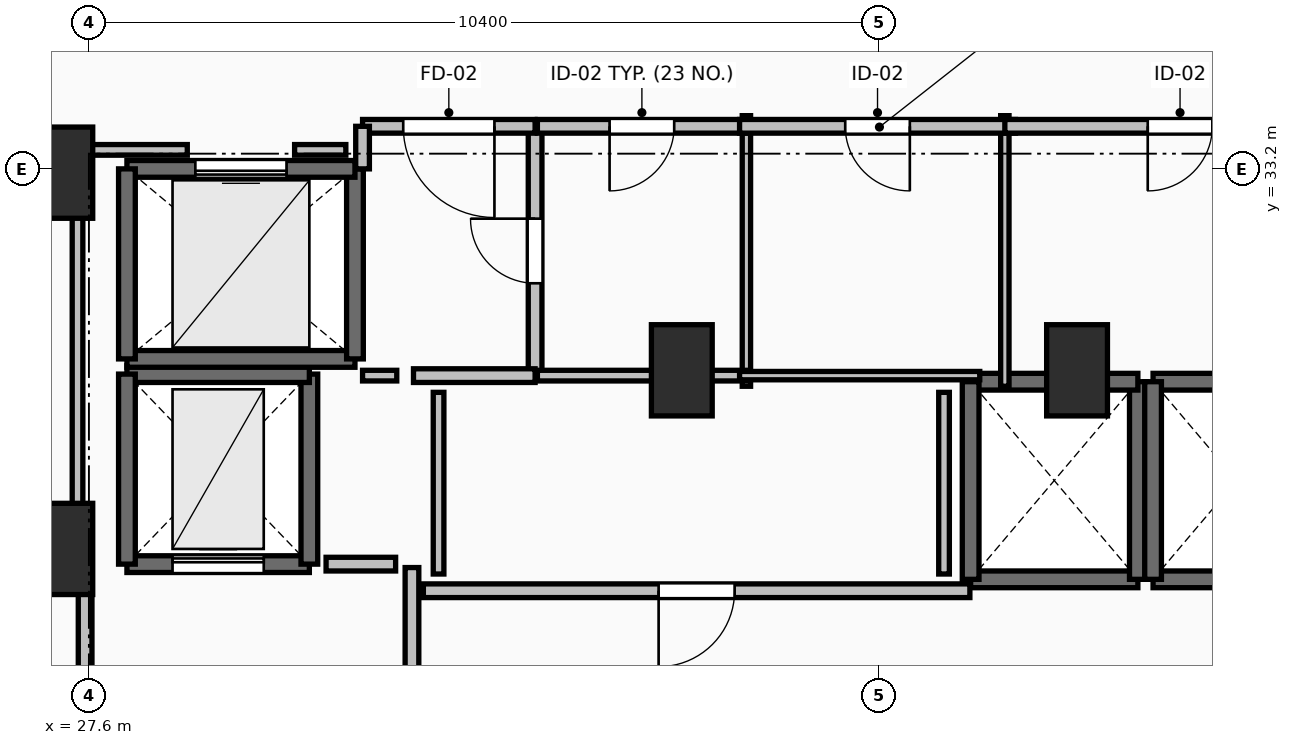
"""IFC4 building model, lengths in metres.
Left out: names, types, materials, properties, quantities, classifications, styles, units other than length and angle.
Written with IfcOpenShell. Run it as: python <this file> out.ifc"""

import sys

from ifc_helpers import new_model, si_unit, direction, frame, frame_2d, origin, origin_2d, place, context, subcontext, project, spatial, rectangle, extrude, element, fill, save


model = new_model("IFC4")
c1 = context("Model", 3, precision=1e-05, world=origin(), true_north=direction((0.0, 1.0)))
c2 = subcontext(c1, "Body", "Model", "MODEL_VIEW")
j1 = project(units=[si_unit("LENGTHUNIT", "METRE"), si_unit("PLANEANGLEUNIT", "RADIAN")], contexts=[c1])
p1 = place(None, origin())
s1 = spatial("IfcSite", under=j1, at=p1, CompositionType="ELEMENT")
p2 = place(p1, origin())
s2 = spatial("IfcBuilding", under=s1, at=p2, CompositionType="ELEMENT")
p3 = place(p2, frame((0.0, 0.0, 164.1)))
s3 = spatial("IfcBuildingStorey", under=s2, at=p3, CompositionType="ELEMENT", Elevation=164.1)
for number, where, z_axis, x_axis in (
    (1, (27.25, 28.2, 0.0), (0.0, 0.0, 1.0), (1.0, 0.0, 0.0)),
    (2, (27.25, 33.15, 0.0), (0.0, 0.0, 1.0), (1.0, 0.0, 0.0)),
    (3, (35.4, 30.55, 0.0), (0.0, 0.0, 1.0), (1.0, 0.0, 0.0)),
    (4, (40.6, 30.55, 0.0), (0.0, 0.0, 1.0), (1.0, 0.0, 0.0)),
):
    element("IfcColumn", number, at=place(p3, frame(where, z_axis=z_axis, x_axis=x_axis)), inside=s3, PredefinedType="PILASTER", context=c2, shape_type="SweptSolid", body=[
        extrude(rectangle(XDim=0.8, YDim=1.2, at=origin_2d()), origin(), (0.0, 0.0, 1.0), 3.5),
    ])
p4 = place(p3, frame((39.2, 27.8, 0.0), z_axis=(0.0, 0.0, 1.0), x_axis=(1.0, 0.0, 0.0)))
e5 = element("IfcWall", 5, at=p4, inside=s3, PredefinedType="SOLIDWALL", context=c2, shape_type="SweptSolid", body=[
    extrude(rectangle(XDim=2.2, YDim=0.22, at=frame_2d((1.1, 0.0))), origin(), (0.0, 0.0, 1.0), 3.24),
])
p5 = place(p3, frame((41.4, 27.8, 0.0), z_axis=(0.0, 0.0, 1.0), x_axis=(0.0, 1.0, 0.0)))
e6 = element("IfcWall", 6, at=p5, inside=s3, PredefinedType="SOLIDWALL", context=c2, shape_type="SweptSolid", body=[
    extrude(rectangle(XDim=2.6, YDim=0.22, at=frame_2d((1.3, 0.0))), origin(), (0.0, 0.0, 1.0), 3.24),
])
p6 = place(p3, frame((41.4, 30.4, 0.0), z_axis=(0.0, 0.0, 1.0), x_axis=(-1.0, 0.0, 0.0)))
e7 = element("IfcWall", 7, at=p6, inside=s3, PredefinedType="SOLIDWALL", context=c2, shape_type="SweptSolid", body=[
    extrude(rectangle(XDim=2.2, YDim=0.22, at=frame_2d((1.1, 0.0))), origin(), (0.0, 0.0, 1.0), 3.24),
])
p7 = place(p3, frame((39.2, 30.4, 0.0), z_axis=(0.0, 0.0, 1.0), x_axis=(0.0, -1.0, 0.0)))
e8 = element("IfcWall", 8, at=p7, inside=s3, PredefinedType="SOLIDWALL", context=c2, shape_type="SweptSolid", body=[
    extrude(rectangle(XDim=2.6, YDim=0.22, at=frame_2d((1.3, 0.0))), origin(), (0.0, 0.0, 1.0), 3.24),
])
for number, where, z_axis, x_axis in (
    (9, (41.6, 27.8, 0.0), (0.0, 0.0, 1.0), (1.0, 0.0, 0.0)),
    (10, (43.8, 30.4, 0.0), (0.0, 0.0, 1.0), (-1.0, 0.0, 0.0)),
):
    element("IfcWall", number, at=place(p3, frame(where, z_axis=z_axis, x_axis=x_axis)), inside=s3, PredefinedType="SOLIDWALL", context=c2, shape_type="SweptSolid", body=[
        extrude(rectangle(XDim=2.2, YDim=0.22, at=frame_2d((1.1, 0.0))), origin(), (0.0, 0.0, 1.0), 3.24),
    ])
p8 = place(p3, frame((41.6, 30.4, 0.0), z_axis=(0.0, 0.0, 1.0), x_axis=(0.0, -1.0, 0.0)))
e11 = element("IfcWall", 11, at=p8, inside=s3, PredefinedType="SOLIDWALL", context=c2, shape_type="SweptSolid", body=[
    extrude(rectangle(XDim=2.6, YDim=0.22, at=frame_2d((1.3, 0.0))), origin(), (0.0, 0.0, 1.0), 3.24),
])
p9 = place(p3, frame((28.1, 28.0, 0.0), z_axis=(0.0, 0.0, 1.0), x_axis=(1.0, 0.0, 0.0)))
e12 = element("IfcWall", 12, at=p9, inside=s3, PredefinedType="SHEAR", context=c2, shape_type="SweptSolid", body=[
    extrude(rectangle(XDim=2.4, YDim=0.22, at=frame_2d((1.2, 0.0))), origin(), (0.0, 0.0, 1.0), 3.24),
])
p10 = place(p9, frame((0.6, 0.0, 0.0)))
e13 = element("IfcOpeningElement", 13, at=p10, cuts=e12, PredefinedType="OPENING", context=c2, shape_type="SweptSolid", body=[
    extrude(rectangle(XDim=1.2, YDim=2.2, at=frame_2d((0.6, 1.1))), frame((0.0, 0.125, 0.0), z_axis=(0.0, -1.0, 0.0), x_axis=(1.0, 0.0, 0.0)), (0.0, 0.0, 1.0), 0.25),
])
p11 = place(p3, frame((30.5, 28.0, 0.0), z_axis=(0.0, 0.0, 1.0), x_axis=(0.0, 1.0, 0.0)))
e14 = element("IfcWall", 14, at=p11, inside=s3, PredefinedType="SHEAR", context=c2, shape_type="SweptSolid", body=[
    extrude(rectangle(XDim=2.5, YDim=0.22, at=frame_2d((1.25, 0.0))), origin(), (0.0, 0.0, 1.0), 3.24),
])
p12 = place(p3, frame((30.5, 30.5, 0.0), z_axis=(0.0, 0.0, 1.0), x_axis=(-1.0, 0.0, 0.0)))
e15 = element("IfcWall", 15, at=p12, inside=s3, PredefinedType="SHEAR", context=c2, shape_type="SweptSolid", body=[
    extrude(rectangle(XDim=2.4, YDim=0.22, at=frame_2d((1.2, 0.0))), origin(), (0.0, 0.0, 1.0), 3.24),
])
p13 = place(p3, frame((28.1, 30.5, 0.0), z_axis=(0.0, 0.0, 1.0), x_axis=(0.0, -1.0, 0.0)))
e16 = element("IfcWall", 16, at=p13, inside=s3, PredefinedType="SHEAR", context=c2, shape_type="SweptSolid", body=[
    extrude(rectangle(XDim=2.5, YDim=0.22, at=frame_2d((1.25, 0.0))), origin(), (0.0, 0.0, 1.0), 3.24),
])
p14 = place(p3, frame((28.1, 30.7, 0.0), z_axis=(0.0, 0.0, 1.0), x_axis=(1.0, 0.0, 0.0)))
e17 = element("IfcWall", 17, at=p14, inside=s3, PredefinedType="SOLIDWALL", context=c2, shape_type="SweptSolid", body=[
    extrude(rectangle(XDim=3.0, YDim=0.22, at=frame_2d((1.5, 0.0))), origin(), (0.0, 0.0, 1.0), 3.24),
])
p15 = place(p3, frame((31.1, 30.7, 0.0), z_axis=(0.0, 0.0, 1.0), x_axis=(0.0, 1.0, 0.0)))
e18 = element("IfcWall", 18, at=p15, inside=s3, PredefinedType="SOLIDWALL", context=c2, shape_type="SweptSolid", body=[
    extrude(rectangle(XDim=2.5, YDim=0.22, at=frame_2d((1.25, 0.0))), origin(), (0.0, 0.0, 1.0), 3.24),
])
p16 = place(p3, frame((31.1, 33.2, 0.0), z_axis=(0.0, 0.0, 1.0), x_axis=(-1.0, 0.0, 0.0)))
e19 = element("IfcWall", 19, at=p16, inside=s3, PredefinedType="SOLIDWALL", context=c2, shape_type="SweptSolid", body=[
    extrude(rectangle(XDim=3.0, YDim=0.22, at=frame_2d((1.5, 0.0))), origin(), (0.0, 0.0, 1.0), 3.24),
])
p17 = place(p16, frame((0.9, 0.0, 0.0)))
e20 = element("IfcOpeningElement", 20, at=p17, cuts=e19, PredefinedType="OPENING", context=c2, shape_type="SweptSolid", body=[
    extrude(rectangle(XDim=1.2, YDim=2.2, at=frame_2d((0.6, 1.1))), frame((0.0, 0.125, 0.0), z_axis=(0.0, -1.0, 0.0), x_axis=(1.0, 0.0, 0.0)), (0.0, 0.0, 1.0), 0.25),
])
p18 = place(p3, frame((28.1, 33.2, 0.0), z_axis=(0.0, 0.0, 1.0), x_axis=(0.0, -1.0, 0.0)))
e21 = element("IfcWall", 21, at=p18, inside=s3, PredefinedType="SOLIDWALL", context=c2, shape_type="SweptSolid", body=[
    extrude(rectangle(XDim=2.5, YDim=0.22, at=frame_2d((1.25, 0.0))), origin(), (0.0, 0.0, 1.0), 3.24),
])
p19 = place(p3, frame((31.85, 24.045, 0.0), z_axis=(0.0, 0.0, 1.0), x_axis=(0.0, 1.0, 0.0)))
e22 = element("IfcWall", 22, at=p19, inside=s3, PredefinedType="PARTITIONING", context=c2, shape_type="SweptSolid", body=[
    extrude(rectangle(XDim=3.91, YDim=0.18, at=frame_2d((1.955, 0.0))), origin(), (0.0, 0.0, 1.0), 3.24),
])
p20 = place(p19, frame((1.355, 0.0, 0.0)))
e23 = element("IfcOpeningElement", 23, at=p20, cuts=e22, PredefinedType="OPENING", context=c2, shape_type="SweptSolid", body=[
    extrude(rectangle(XDim=1.2, YDim=2.15, at=frame_2d((0.6, 1.075))), frame((0.0, 0.105, 0.0), z_axis=(0.0, -1.0, 0.0), x_axis=(1.0, 0.0, 0.0)), (0.0, 0.0, 1.0), 0.21),
])
p21 = place(p3, frame((27.55, 28.0, 0.0), z_axis=(0.0, 0.0, 1.0), x_axis=(0.0, -1.0, 0.0)))
e24 = element("IfcWall", 24, at=p21, inside=s3, PredefinedType="PARTITIONING", context=c2, shape_type="SweptSolid", body=[
    extrude(rectangle(XDim=4.05, YDim=0.18, at=frame_2d((2.025, 0.0))), origin(), (0.0, 0.0, 1.0), 3.24),
])
p22 = place(p21, frame((1.425, 0.0, 0.0)))
e25 = element("IfcOpeningElement", 25, at=p22, cuts=e24, PredefinedType="OPENING", context=c2, shape_type="SweptSolid", body=[
    extrude(rectangle(XDim=1.2, YDim=2.15, at=frame_2d((0.6, 1.075))), frame((0.0, 0.105, 0.0), z_axis=(0.0, -1.0, 0.0), x_axis=(1.0, 0.0, 0.0)), (0.0, 0.0, 1.0), 0.21),
])
p23 = place(p3, frame((33.47, 30.48, 0.0), z_axis=(0.0, 0.0, 1.0), x_axis=(0.0, 1.0, 0.0)))
e26 = element("IfcWall", 26, at=p23, inside=s3, PredefinedType="PARTITIONING", context=c2, shape_type="SweptSolid", body=[
    extrude(rectangle(XDim=3.28, YDim=0.18, at=frame_2d((1.64, 0.0))), origin(), (0.0, 0.0, 1.0), 3.24),
])
p24 = place(p23, frame((1.215, 0.0, 0.0)))
e27 = element("IfcOpeningElement", 27, at=p24, cuts=e26, PredefinedType="OPENING", context=c2, shape_type="SweptSolid", body=[
    extrude(rectangle(XDim=0.85, YDim=2.1, at=frame_2d((0.425, 1.05))), frame((0.0, 0.105, 0.0), z_axis=(0.0, -1.0, 0.0), x_axis=(1.0, 0.0, 0.0)), (0.0, 0.0, 1.0), 0.21),
])
p25 = place(p3, frame((31.87, 30.48, 0.0), z_axis=(0.0, 0.0, 1.0), x_axis=(1.0, 0.0, 0.0)))
e28 = element("IfcWall", 28, at=p25, inside=s3, PredefinedType="PARTITIONING", context=c2, shape_type="SweptSolid", body=[
    extrude(rectangle(XDim=1.6, YDim=0.18, at=frame_2d((0.8, 0.0))), origin(), (0.0, 0.0, 1.0), 3.24),
])
p26 = place(p3, frame((33.47, 33.76, 0.0), z_axis=(0.0, 0.0, 1.0), x_axis=(-1.0, 0.0, 0.0)))
e29 = element("IfcWall", 29, at=p26, inside=s3, PredefinedType="PARTITIONING", context=c2, shape_type="SweptSolid", body=[
    extrude(rectangle(XDim=2.27, YDim=0.18, at=frame_2d((1.135, 0.0))), origin(), (0.0, 0.0, 1.0), 3.24),
])
p27 = place(p26, frame((0.535, 0.0, 0.0)))
e30 = element("IfcOpeningElement", 30, at=p27, cuts=e29, PredefinedType="OPENING", context=c2, shape_type="SweptSolid", body=[
    extrude(rectangle(XDim=1.2, YDim=2.15, at=frame_2d((0.6, 1.075))), frame((0.0, 0.105, 0.0), z_axis=(0.0, -1.0, 0.0), x_axis=(1.0, 0.0, 0.0)), (0.0, 0.0, 1.0), 0.21),
])
p28 = place(p3, frame((31.2, 33.76, 0.0), z_axis=(0.0, 0.0, 1.0), x_axis=(0.0, -1.0, 0.0)))
e31 = element("IfcWall", 31, at=p28, inside=s3, PredefinedType="PARTITIONING", context=c2, shape_type="SweptSolid", body=[
    extrude(rectangle(XDim=0.56, YDim=0.18, at=frame_2d((0.28, 0.0))), origin(), (0.0, 0.0, 1.0), 3.24),
])
p29 = place(p3, frame((39.19, 27.65, 0.0), z_axis=(0.0, 0.0, 1.0), x_axis=(-1.0, 0.0, 0.0)))
e32 = element("IfcWall", 32, at=p29, inside=s3, PredefinedType="PARTITIONING", context=c2, shape_type="SweptSolid", body=[
    extrude(rectangle(XDim=7.19, YDim=0.18, at=frame_2d((3.595, 0.0))), origin(), (0.0, 0.0, 1.0), 3.24),
])
p30 = place(p29, frame((3.095, 0.0, 0.0)))
e33 = element("IfcOpeningElement", 33, at=p30, cuts=e32, PredefinedType="OPENING", context=c2, shape_type="SweptSolid", body=[
    extrude(rectangle(XDim=1.0, YDim=2.15, at=frame_2d((0.5, 1.075))), frame((0.0, 0.105, 0.0), z_axis=(0.0, -1.0, 0.0), x_axis=(1.0, 0.0, 0.0)), (0.0, 0.0, 1.0), 0.21),
])
p31 = place(p3, frame((36.25, 30.34, 0.0), z_axis=(0.0, 0.0, 1.0), x_axis=(0.0, 1.0, 0.0)))
e34 = element("IfcWall", 34, at=p31, inside=s3, PredefinedType="PARTITIONING", context=c2, shape_type="SweptSolid", body=[
    extrude(rectangle(XDim=3.56, YDim=0.11, at=frame_2d((1.78, 0.0))), origin(), (0.0, 0.0, 1.0), 2.432),
])
p32 = place(p3, frame((33.5, 30.48, 0.0), z_axis=(0.0, 0.0, 1.0), x_axis=(1.0, 0.0, 0.0)))
e35 = element("IfcWall", 35, at=p32, inside=s3, PredefinedType="PARTITIONING", context=c2, shape_type="SweptSolid", body=[
    extrude(rectangle(XDim=2.75, YDim=0.14, at=frame_2d((1.375, 0.0))), origin(), (0.0, 0.0, 1.0), 2.432),
])
p33 = place(p3, frame((36.25, 33.76, 0.0), z_axis=(0.0, 0.0, 1.0), x_axis=(-1.0, 0.0, 0.0)))
e36 = element("IfcWall", 36, at=p33, inside=s3, PredefinedType="PARTITIONING", context=c2, shape_type="SweptSolid", body=[
    extrude(rectangle(XDim=2.75, YDim=0.18, at=frame_2d((1.375, 0.0))), origin(), (0.0, 0.0, 1.0), 3.24),
])
p34 = place(p33, frame((0.95, 0.0, 0.0)))
e37 = element("IfcOpeningElement", 37, at=p34, cuts=e36, PredefinedType="OPENING", context=c2, shape_type="SweptSolid", body=[
    extrude(rectangle(XDim=0.85, YDim=2.1, at=frame_2d((0.425, 1.05))), frame((0.0, 0.105, 0.0), z_axis=(0.0, -1.0, 0.0), x_axis=(1.0, 0.0, 0.0)), (0.0, 0.0, 1.0), 0.21),
])
p35 = place(p3, frame((39.65, 30.34, 0.0), z_axis=(0.0, 0.0, 1.0), x_axis=(0.0, 1.0, 0.0)))
e38 = element("IfcWall", 38, at=p35, inside=s3, PredefinedType="PARTITIONING", context=c2, shape_type="SweptSolid", body=[
    extrude(rectangle(XDim=3.56, YDim=0.11, at=frame_2d((1.78, 0.0))), origin(), (0.0, 0.0, 1.0), 2.432),
])
p36 = place(p3, frame((36.16, 30.48, 0.0), z_axis=(0.0, 0.0, 1.0), x_axis=(1.0, 0.0, 0.0)))
e39 = element("IfcWall", 39, at=p36, inside=s3, PredefinedType="PARTITIONING", context=c2, shape_type="SweptSolid", body=[
    extrude(rectangle(XDim=3.16, YDim=0.11, at=frame_2d((1.58, 0.0))), origin(), (0.0, 0.0, 1.0), 2.432),
])
p37 = place(p3, frame((39.79, 33.76, 0.0), z_axis=(0.0, 0.0, 1.0), x_axis=(-1.0, 0.0, 0.0)))
e40 = element("IfcWall", 40, at=p37, inside=s3, PredefinedType="PARTITIONING", context=c2, shape_type="SweptSolid", body=[
    extrude(rectangle(XDim=3.63, YDim=0.18, at=frame_2d((1.815, 0.0))), origin(), (0.0, 0.0, 1.0), 3.24),
])
p38 = place(p37, frame((1.39, 0.0, 0.0)))
e41 = element("IfcOpeningElement", 41, at=p38, cuts=e40, PredefinedType="OPENING", context=c2, shape_type="SweptSolid", body=[
    extrude(rectangle(XDim=0.85, YDim=2.1, at=frame_2d((0.425, 1.05))), frame((0.0, 0.105, 0.0), z_axis=(0.0, -1.0, 0.0), x_axis=(1.0, 0.0, 0.0)), (0.0, 0.0, 1.0), 0.21),
])
p39 = place(p3, frame((44.26, 33.76, 0.0), z_axis=(0.0, 0.0, 1.0), x_axis=(-1.0, 0.0, 0.0)))
e42 = element("IfcWall", 42, at=p39, inside=s3, PredefinedType="PARTITIONING", context=c2, shape_type="SweptSolid", body=[
    extrude(rectangle(XDim=4.61, YDim=0.18, at=frame_2d((2.305, 0.0))), origin(), (0.0, 0.0, 1.0), 3.24),
])
p40 = place(p39, frame((1.88, 0.0, 0.0)))
e43 = element("IfcOpeningElement", 43, at=p40, cuts=e42, PredefinedType="OPENING", context=c2, shape_type="SweptSolid", body=[
    extrude(rectangle(XDim=0.85, YDim=2.1, at=frame_2d((0.425, 1.05))), frame((0.0, 0.105, 0.0), z_axis=(0.0, -1.0, 0.0), x_axis=(1.0, 0.0, 0.0)), (0.0, 0.0, 1.0), 0.21),
])
p41 = place(p3, frame((31.635, 28.0, 0.0), z_axis=(0.0, 0.0, 1.0), x_axis=(-1.0, 0.0, 0.0)))
e44 = element("IfcWall", 44, at=p41, inside=s3, PredefinedType="PARTITIONING", context=c2, shape_type="SweptSolid", body=[
    extrude(rectangle(XDim=0.915, YDim=0.18, at=frame_2d((0.458, 0.0))), origin(), (0.0, 0.0, 1.0), 3.24),
])
p42 = place(p3, frame((31.2, 30.48, 0.0), z_axis=(0.0, 0.0, 1.0), x_axis=(1.0, 0.0, 0.0)))
e45 = element("IfcWall", 45, at=p42, inside=s3, PredefinedType="PARTITIONING", context=c2, shape_type="SweptSolid", body=[
    extrude(rectangle(XDim=0.45, YDim=0.14, at=frame_2d((0.225, 0.0))), origin(), (0.0, 0.0, 1.0), 3.24),
])
for number, where, z_axis, x_axis in (
    (46, (32.2, 30.26, 0.0), (0.0, 0.0, 1.0), (0.0, -1.0, 0.0)),
    (47, (38.85, 27.87, 0.0), (0.0, 0.0, 1.0), (0.0, 1.0, 0.0)),
):
    element("IfcWall", number, at=place(p3, frame(where, z_axis=z_axis, x_axis=x_axis)), inside=s3, PredefinedType="PARTITIONING", context=c2, shape_type="SweptSolid", body=[
        extrude(rectangle(XDim=2.39, YDim=0.14, at=frame_2d((1.195, 0.0))), origin(), (0.0, 0.0, 1.0), 3.24),
    ])
p43 = place(p3, frame((30.98, 33.45, 0.0), z_axis=(0.0, 0.0, 1.0), x_axis=(-1.0, 0.0, 0.0)))
e48 = element("IfcWall", 48, at=p43, inside=s3, PredefinedType="PARTITIONING", context=c2, shape_type="SweptSolid", body=[
    extrude(rectangle(XDim=0.674, YDim=0.14, at=frame_2d((0.337, 0.0))), origin(), (0.0, 0.0, 1.0), 3.24),
])
p44 = place(p3, frame((28.894, 33.45, 0.0), z_axis=(0.0, 0.0, 1.0), x_axis=(-1.0, 0.0, 0.0)))
e49 = element("IfcWall", 49, at=p44, inside=s3, PredefinedType="PARTITIONING", context=c2, shape_type="SweptSolid", body=[
    extrude(rectangle(XDim=1.444, YDim=0.14, at=frame_2d((0.722, 0.0))), origin(), (0.0, 0.0, 1.0), 2.432),
])
p45 = place(p3, frame((27.45, 33.45, 0.0), z_axis=(0.0, 0.0, 1.0), x_axis=(0.0, -1.0, 0.0)))
e50 = element("IfcWall", 50, at=p45, inside=s3, PredefinedType="PARTITIONING", context=c2, shape_type="SweptSolid", body=[
    extrude(rectangle(XDim=5.254, YDim=0.14, at=frame_2d((2.627, 0.0))), origin(), (0.0, 0.0, 1.0), 2.432),
])
p46 = place(p10, origin())
e51 = element("IfcDoor", 51, at=p46, inside=s3, OperationType="SLIDING_TO_LEFT", PredefinedType="DOOR", context=c2, shape_type="SweptSolid", body=[
    extrude(rectangle(XDim=1.2, YDim=2.2, at=frame_2d((0.6, 1.1))), frame((0.0, 0.025, 0.0), z_axis=(0.0, -1.0, 0.0), x_axis=(1.0, 0.0, 0.0)), (0.0, 0.0, 1.0), 0.05),
])
fill(e13, e51)
p47 = place(p17, origin())
e52 = element("IfcDoor", 52, at=p47, inside=s3, OperationType="SLIDING_TO_LEFT", PredefinedType="DOOR", context=c2, shape_type="SweptSolid", body=[
    extrude(rectangle(XDim=1.2, YDim=2.2, at=frame_2d((0.6, 1.1))), frame((0.0, 0.025, 0.0), z_axis=(0.0, -1.0, 0.0), x_axis=(1.0, 0.0, 0.0)), (0.0, 0.0, 1.0), 0.05),
])
fill(e20, e52)
p48 = place(p24, origin())
e53 = element("IfcDoor", 53, at=p48, inside=s3, OperationType="SINGLE_SWING_RIGHT", PredefinedType="DOOR", context=c2, shape_type="SweptSolid", body=[
    extrude(rectangle(XDim=0.85, YDim=2.1, at=frame_2d((0.425, 1.05))), frame((0.0, 0.025, 0.0), z_axis=(0.0, -1.0, 0.0), x_axis=(1.0, 0.0, 0.0)), (0.0, 0.0, 1.0), 0.05),
])
fill(e27, e53)
p49 = place(p27, origin())
e54 = element("IfcDoor", 54, at=p49, inside=s3, OperationType="SINGLE_SWING_LEFT", PredefinedType="DOOR", context=c2, shape_type="SweptSolid", body=[
    extrude(rectangle(XDim=1.2, YDim=2.15, at=frame_2d((0.6, 1.075))), frame((0.0, 0.025, 0.0), z_axis=(0.0, -1.0, 0.0), x_axis=(1.0, 0.0, 0.0)), (0.0, 0.0, 1.0), 0.05),
])
fill(e30, e54)
p50 = place(p30, origin())
e55 = element("IfcDoor", 55, at=p50, inside=s3, OperationType="SINGLE_SWING_RIGHT", PredefinedType="DOOR", context=c2, shape_type="SweptSolid", body=[
    extrude(rectangle(XDim=1.0, YDim=2.15, at=frame_2d((0.5, 1.075))), frame((0.0, 0.025, 0.0), z_axis=(0.0, -1.0, 0.0), x_axis=(1.0, 0.0, 0.0)), (0.0, 0.0, 1.0), 0.05),
])
fill(e33, e55)
p51 = place(p34, origin())
e56 = element("IfcDoor", 56, at=p51, inside=s3, OperationType="SINGLE_SWING_RIGHT", PredefinedType="DOOR", context=c2, shape_type="SweptSolid", body=[
    extrude(rectangle(XDim=0.85, YDim=2.1, at=frame_2d((0.425, 1.05))), frame((0.0, 0.025, 0.0), z_axis=(0.0, -1.0, 0.0), x_axis=(1.0, 0.0, 0.0)), (0.0, 0.0, 1.0), 0.05),
])
fill(e37, e56)
p52 = place(p38, origin())
e57 = element("IfcDoor", 57, at=p52, inside=s3, OperationType="SINGLE_SWING_LEFT", PredefinedType="DOOR", context=c2, shape_type="SweptSolid", body=[
    extrude(rectangle(XDim=0.85, YDim=2.1, at=frame_2d((0.425, 1.05))), frame((0.0, 0.025, 0.0), z_axis=(0.0, -1.0, 0.0), x_axis=(1.0, 0.0, 0.0)), (0.0, 0.0, 1.0), 0.05),
])
fill(e41, e57)
p53 = place(p40, origin())
e58 = element("IfcDoor", 58, at=p53, inside=s3, OperationType="SINGLE_SWING_RIGHT", PredefinedType="DOOR", context=c2, shape_type="SweptSolid", body=[
    extrude(rectangle(XDim=0.85, YDim=2.1, at=frame_2d((0.425, 1.05))), frame((0.0, 0.025, 0.0), z_axis=(0.0, -1.0, 0.0), x_axis=(1.0, 0.0, 0.0)), (0.0, 0.0, 1.0), 0.05),
])
fill(e43, e58)
save(model, sys.argv[1])
